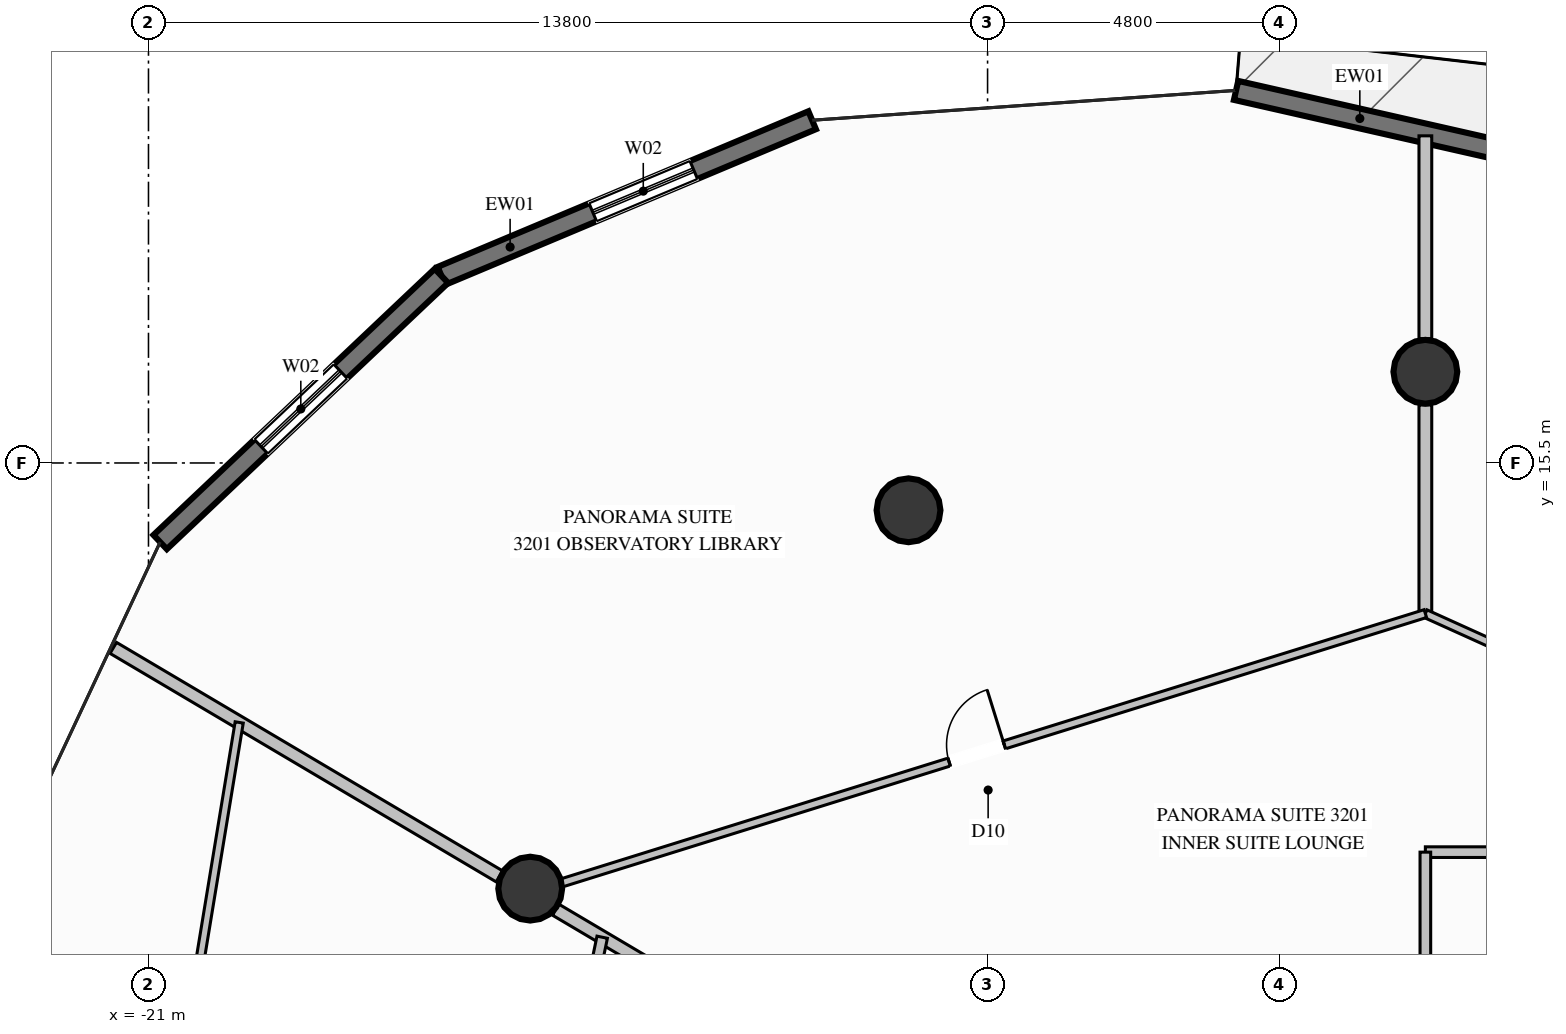
"""IFC4 building model, lengths in metres.
Left out: names, types, materials, properties, quantities, classifications, styles, units other than length and angle.
Written with IfcOpenShell. Run it as: python <this file> out.ifc"""

import sys

from ifc_helpers import new_model, si_unit, direction, frame, frame_2d, origin, origin_2d, place, context, subcontext, project, spatial, rectangle, circle, extrude, element, fill, save


model = new_model("IFC4")
c1 = context("Model", 3, precision=1e-05, world=origin(), true_north=direction((0.0, 1.0)))
c2 = subcontext(c1, "Body", "Model", "MODEL_VIEW")
j1 = project(units=[si_unit("LENGTHUNIT", "METRE"), si_unit("PLANEANGLEUNIT", "RADIAN")], contexts=[c1])
p1 = place(None, origin())
s1 = spatial("IfcSite", under=j1, at=p1, CompositionType="ELEMENT")
p2 = place(p1, origin())
s2 = spatial("IfcBuilding", under=s1, at=p2, CompositionType="ELEMENT")
p3 = place(p2, frame((0.0, 0.0, 120.6)))
s3 = spatial("IfcBuildingStorey", under=s2, at=p3, CompositionType="ELEMENT", Elevation=120.6)
for number, where, z_axis, x_axis in (
    (1, (0.0, 17.0, 0.0), (0.0, 0.0, 1.0), (1.0, 0.0, 0.0)),
    (2, (-8.5, 14.722, 0.0), (0.0, 0.0, 1.0), (1.0, 0.0, 0.0)),
    (3, (-14.722, 8.5, 0.0), (0.0, 0.0, 1.0), (1.0, 0.0, 0.0)),
):
    element("IfcColumn", number, at=place(p3, frame(where, z_axis=z_axis, x_axis=x_axis)), inside=s3, PredefinedType="COLUMN", context=c2, shape_type="SweptSolid", body=[
        extrude(circle(Radius=0.525, at=origin_2d()), origin(), (0.0, 0.0, 1.0), 3.6),
    ])
p4 = place(p3, frame((-3.113, 21.627, 0.0), z_axis=(0.0, 0.0, 1.0), x_axis=(0.975175922812, -0.22143152343, 0.0)))
e4 = element("IfcWall", 4, at=p4, inside=s3, PredefinedType="SOLIDWALL", context=c2, shape_type="SweptSolid", body=[
    extrude(rectangle(XDim=7.347, YDim=0.32, at=frame_2d((3.674, 0.0))), origin(), (0.0, 0.0, 1.0), 3.35),
])
p5 = place(p4, frame((4.424, 0.0, 0.35)))
e5 = element("IfcOpeningElement", 5, at=p5, cuts=e4, PredefinedType="OPENING", context=c2, shape_type="SweptSolid", body=[
    extrude(rectangle(XDim=1.8, YDim=2.6, at=frame_2d((0.9, 1.3))), frame((0.0, 0.17, 0.0), z_axis=(0.0, -1.0, 0.0), x_axis=(1.0, 0.0, 0.0)), (0.0, 0.0, 1.0), 0.34),
])
p6 = place(p3, frame((-16.182, 18.577, 0.0), z_axis=(0.0, 0.0, 1.0), x_axis=(0.922069875261, 0.387023442618, 0.0)))
e6 = element("IfcWall", 6, at=p6, inside=s3, PredefinedType="SOLIDWALL", context=c2, shape_type="SweptSolid", body=[
    extrude(rectangle(XDim=6.612, YDim=0.32, at=frame_2d((3.306, 0.0))), origin(), (0.0, 0.0, 1.0), 3.35),
])
p7 = place(p6, frame((2.7, 0.0, 0.35)))
e7 = element("IfcOpeningElement", 7, at=p7, cuts=e6, PredefinedType="OPENING", context=c2, shape_type="SweptSolid", body=[
    extrude(rectangle(XDim=1.8, YDim=2.6, at=frame_2d((0.9, 1.3))), frame((0.0, 0.17, 0.0), z_axis=(0.0, -1.0, 0.0), x_axis=(1.0, 0.0, 0.0)), (0.0, 0.0, 1.0), 0.34),
])
p8 = place(p3, frame((-20.808, 14.199, 0.0), z_axis=(0.0, 0.0, 1.0), x_axis=(0.726329279492, 0.68734691223, 0.0)))
e8 = element("IfcWall", 8, at=p8, inside=s3, PredefinedType="SOLIDWALL", context=c2, shape_type="SweptSolid", body=[
    extrude(rectangle(XDim=6.369, YDim=0.32, at=frame_2d((3.185, 0.0))), origin(), (0.0, 0.0, 1.0), 3.35),
])
p9 = place(p8, frame((2.285, 0.0, 0.35)))
e9 = element("IfcOpeningElement", 9, at=p9, cuts=e8, PredefinedType="OPENING", context=c2, shape_type="SweptSolid", body=[
    extrude(rectangle(XDim=1.8, YDim=2.6, at=frame_2d((0.9, 1.3))), frame((0.0, 0.17, 0.0), z_axis=(0.0, -1.0, 0.0), x_axis=(1.0, 0.0, 0.0)), (0.0, 0.0, 1.0), 0.34),
])
p10 = place(p3, frame((-9.396, 5.25, 0.0), z_axis=(0.0, 0.0, 1.0), x_axis=(-0.860613457584, 0.509258752134, 0.0)))
e10 = element("IfcWall", 10, at=p10, inside=s3, PredefinedType="PARTITIONING", context=c2, shape_type="SweptSolid", body=[
    extrude(rectangle(XDim=5.701, YDim=0.21, at=frame_2d((2.85, 0.0))), origin(), (0.0, 0.0, 1.0), 2.719),
])
p11 = place(p3, frame((-15.228, 8.701, 0.0), z_axis=(0.0, 0.0, 1.0), x_axis=(-0.860620773238, 0.509246388962, 0.0)))
e11 = element("IfcWall", 11, at=p11, inside=s3, PredefinedType="PARTITIONING", context=c2, shape_type="SweptSolid", body=[
    extrude(rectangle(XDim=7.38, YDim=0.21, at=frame_2d((3.69, 0.0))), origin(), (0.0, 0.0, 1.0), 3.35),
])
for number, where, z_axis, x_axis in (
    (12, (0.0, 9.1, 0.0), (0.0, 0.0, 1.0), (1.0, 0.0, 0.0)),
    (13, (0.0, 9.1, 0.0), (0.0, 0.0, 1.0), (0.0, -1.0, 0.0)),
):
    element("IfcWall", number, at=place(p3, frame(where, z_axis=z_axis, x_axis=x_axis)), inside=s3, PredefinedType="PLUMBINGWALL", context=c2, shape_type="SweptSolid", body=[
        extrude(rectangle(XDim=2.25, YDim=0.175, at=frame_2d((1.125, 0.0))), origin(), (0.0, 0.0, 1.0), 3.35),
    ])
p12 = place(p3, frame((0.0, 13.023, 0.0), z_axis=(0.0, 0.0, 1.0), x_axis=(0.0, 1.0, 0.0)))
e14 = element("IfcWall", 14, at=p12, inside=s3, PredefinedType="PARTITIONING", context=c2, shape_type="SweptSolid", body=[
    extrude(rectangle(XDim=3.432, YDim=0.21, at=frame_2d((1.716, 0.0))), origin(), (0.0, 0.0, 1.0), 3.35),
])
p13 = place(p3, frame((0.0, 17.545, 0.0), z_axis=(0.0, 0.0, 1.0), x_axis=(0.0, 1.0, 0.0)))
e15 = element("IfcWall", 15, at=p13, inside=s3, PredefinedType="PARTITIONING", context=c2, shape_type="SweptSolid", body=[
    extrude(rectangle(XDim=3.335, YDim=0.21, at=frame_2d((1.667, 0.0))), origin(), (0.0, 0.0, 1.0), 3.35),
])
p14 = place(p3, frame((0.0, 13.023, 0.0), z_axis=(0.0, 0.0, 1.0), x_axis=(0.911139602209, -0.412097834605, 0.0)))
e16 = element("IfcWall", 16, at=p14, inside=s3, PredefinedType="PARTITIONING", context=c2, shape_type="SweptSolid", body=[
    extrude(rectangle(XDim=13.987, YDim=0.135, at=frame_2d((6.993, 0.0))), origin(), (0.0, 0.0, 1.0), 3.35),
])
p15 = place(p14, frame((6.518, 0.0, 0.0)))
e17 = element("IfcOpeningElement", 17, at=p15, cuts=e16, PredefinedType="OPENING", context=c2, shape_type="SweptSolid", body=[
    extrude(rectangle(XDim=0.95, YDim=2.1, at=frame_2d((0.475, 1.05))), frame((0.0, 0.078, 0.0), z_axis=(0.0, -1.0, 0.0), x_axis=(1.0, 0.0, 0.0)), (0.0, 0.0, 1.0), 0.155),
])
p16 = place(p3, frame((-14.757, 8.422, 0.0), z_axis=(0.0, 0.0, 1.0), x_axis=(0.954677897028, 0.297640912722, 0.0)))
e18 = element("IfcWall", 18, at=p16, inside=s3, PredefinedType="PARTITIONING", context=c2, shape_type="SweptSolid", body=[
    extrude(rectangle(XDim=15.458, YDim=0.135, at=frame_2d((7.729, 0.0))), origin(), (0.0, 0.0, 1.0), 2.878),
])
p17 = place(p16, frame((7.254, 0.0, 0.0)))
e19 = element("IfcOpeningElement", 19, at=p17, cuts=e18, PredefinedType="OPENING", context=c2, shape_type="SweptSolid", body=[
    extrude(rectangle(XDim=0.95, YDim=2.1, at=frame_2d((0.475, 1.05))), frame((0.0, 0.078, 0.0), z_axis=(0.0, -1.0, 0.0), x_axis=(1.0, 0.0, 0.0)), (0.0, 0.0, 1.0), 0.155),
])
p18 = place(p3, frame((-13.538, 7.701, 0.0), z_axis=(0.0, 0.0, 1.0), x_axis=(-0.203225696563, -0.979131919741, 0.0)))
e20 = element("IfcWall", 20, at=p18, inside=s3, PredefinedType="PLUMBINGWALL", context=c2, shape_type="SweptSolid", body=[
    extrude(rectangle(XDim=3.346, YDim=0.175, at=frame_2d((1.673, 0.0))), origin(), (0.0, 0.0, 1.0), 3.35),
])
p19 = place(p3, frame((-19.508, 11.233, 0.0), z_axis=(0.0, 0.0, 1.0), x_axis=(-0.16248342038, -0.986711273931, 0.0)))
e21 = element("IfcWall", 21, at=p19, inside=s3, PredefinedType="PARTITIONING", context=c2, shape_type="SweptSolid", body=[
    extrude(rectangle(XDim=11.41, YDim=0.135, at=frame_2d((5.705, 0.0))), origin(), (0.0, 0.0, 1.0), 3.35),
])
p20 = place(p19, frame((5.23, 0.0, 0.0)))
e22 = element("IfcOpeningElement", 22, at=p20, cuts=e21, PredefinedType="OPENING", context=c2, shape_type="SweptSolid", body=[
    extrude(rectangle(XDim=0.95, YDim=2.1, at=frame_2d((0.475, 1.05))), frame((0.0, 0.078, 0.0), z_axis=(0.0, -1.0, 0.0), x_axis=(1.0, 0.0, 0.0)), (0.0, 0.0, 1.0), 0.155),
])
p21 = place(p7, origin())
e23 = element("IfcWindow", 23, at=p21, inside=s3, PartitioningType="SINGLE_PANEL", PredefinedType="WINDOW", context=c2, shape_type="SweptSolid", body=[
    extrude(rectangle(XDim=1.8, YDim=2.6, at=frame_2d((0.9, 1.3))), frame((0.0, 0.03, 0.0), z_axis=(0.0, -1.0, 0.0), x_axis=(1.0, 0.0, 0.0)), (0.0, 0.0, 1.0), 0.06),
])
fill(e7, e23)
p22 = place(p9, origin())
e24 = element("IfcWindow", 24, at=p22, inside=s3, PartitioningType="SINGLE_PANEL", PredefinedType="WINDOW", context=c2, shape_type="SweptSolid", body=[
    extrude(rectangle(XDim=1.8, YDim=2.6, at=frame_2d((0.9, 1.3))), frame((0.0, 0.03, 0.0), z_axis=(0.0, -1.0, 0.0), x_axis=(1.0, 0.0, 0.0)), (0.0, 0.0, 1.0), 0.06),
])
fill(e9, e24)
p23 = place(p17, origin())
e25 = element("IfcDoor", 25, at=p23, inside=s3, OperationType="SINGLE_SWING_RIGHT", PredefinedType="DOOR", context=c2, shape_type="SweptSolid", body=[
    extrude(rectangle(XDim=0.95, YDim=2.1, at=frame_2d((0.475, 1.05))), frame((0.0, 0.025, 0.0), z_axis=(0.0, -1.0, 0.0), x_axis=(1.0, 0.0, 0.0)), (0.0, 0.0, 1.0), 0.05),
])
fill(e19, e25)
save(model, sys.argv[1])
